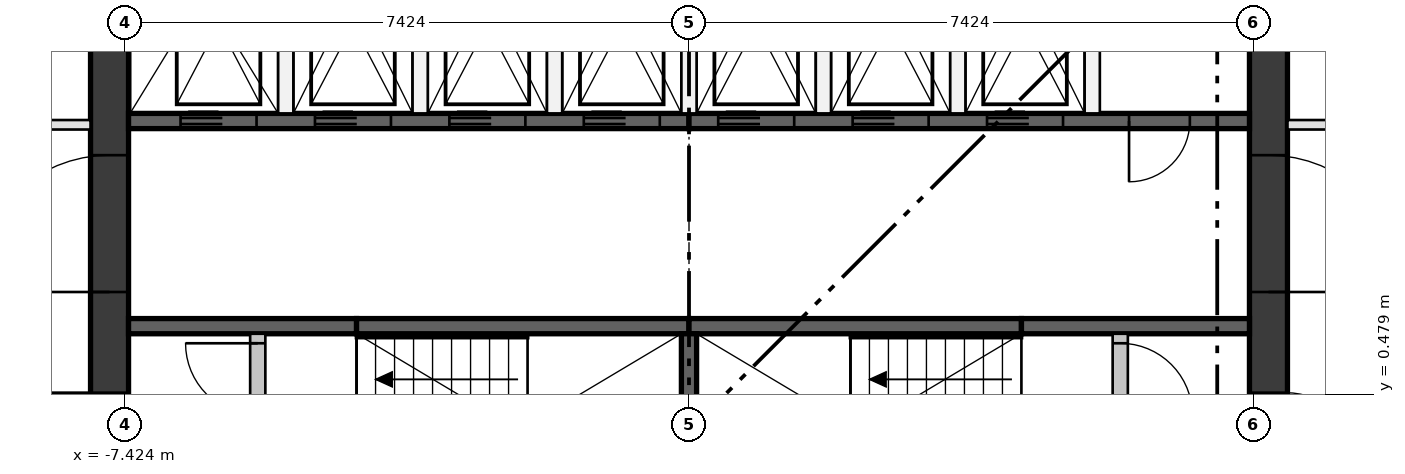
"""IFC4 building model, lengths in metres.
Left out: names, types, materials, properties, quantities, classifications, styles, units other than length and angle.
Written with IfcOpenShell. Run it as: python <this file> out.ifc"""

import sys

from ifc_helpers import new_model, si_unit, direction, frame, frame_2d, origin, place, context, subcontext, project, spatial, rectangle, extrude, element, fill, save


model = new_model("IFC4")
c1 = context("Model", 3, precision=1e-05, world=origin(), true_north=direction((0.0, 1.0)))
c2 = subcontext(c1, "Body", "Model", "MODEL_VIEW")
j1 = project(units=[si_unit("LENGTHUNIT", "METRE"), si_unit("PLANEANGLEUNIT", "RADIAN")], contexts=[c1])
p1 = place(None, origin())
s1 = spatial("IfcSite", under=j1, at=p1, CompositionType="ELEMENT")
p2 = place(p1, origin())
s2 = spatial("IfcBuilding", under=s1, at=p2, CompositionType="ELEMENT")
p3 = place(p2, frame((0.0, 0.0, 194.35)))
s3 = spatial("IfcBuildingStorey", under=s2, at=p3, CompositionType="ELEMENT", Elevation=194.35)
p4 = place(p3, frame((-7.624, -7.374, 0.0), z_axis=(0.0, 0.0, 1.0), x_axis=(0.0, 1.0, 0.0)))
e1 = element("IfcWall", 1, at=p4, inside=s3, PredefinedType="SHEAR", context=c2, shape_type="SweptSolid", body=[
    extrude(rectangle(XDim=14.748, YDim=0.5, at=frame_2d((7.374, 0.0))), origin(), (0.0, 0.0, 1.0), 3.35),
])
p5 = place(p4, frame((6.874, 0.0, 0.0)))
e2 = element("IfcOpeningElement", 2, at=p5, cuts=e1, PredefinedType="OPENING", context=c2, shape_type="SweptSolid", body=[
    extrude(rectangle(XDim=1.0, YDim=2.1, at=frame_2d((0.5, 1.05))), frame((0.0, 0.26, 0.0), z_axis=(0.0, -1.0, 0.0), x_axis=(1.0, 0.0, 0.0)), (0.0, 0.0, 1.0), 0.52),
])
p6 = place(p4, frame((3.75, 0.0, 0.0)))
e3 = element("IfcOpeningElement", 3, at=p6, cuts=e1, PredefinedType="OPENING", context=c2, shape_type="SweptSolid", body=[
    extrude(rectangle(XDim=1.8, YDim=2.1, at=frame_2d((0.9, 1.05))), frame((0.0, 0.26, 0.0), z_axis=(0.0, -1.0, 0.0), x_axis=(1.0, 0.0, 0.0)), (0.0, 0.0, 1.0), 0.52),
])
p7 = place(p4, frame((9.198, 0.0, 0.0)))
e4 = element("IfcOpeningElement", 4, at=p7, cuts=e1, PredefinedType="OPENING", context=c2, shape_type="SweptSolid", body=[
    extrude(rectangle(XDim=1.8, YDim=2.1, at=frame_2d((0.9, 1.05))), frame((0.0, 0.26, 0.0), z_axis=(0.0, -1.0, 0.0), x_axis=(1.0, 0.0, 0.0)), (0.0, 0.0, 1.0), 0.52),
])
p8 = place(p3, frame((7.624, -7.374, 0.0), z_axis=(0.0, 0.0, 1.0), x_axis=(0.0, 1.0, 0.0)))
e5 = element("IfcWall", 5, at=p8, inside=s3, PredefinedType="SHEAR", context=c2, shape_type="SweptSolid", body=[
    extrude(rectangle(XDim=14.748, YDim=0.5, at=frame_2d((7.374, 0.0))), origin(), (0.0, 0.0, 1.0), 3.35),
])
p9 = place(p8, frame((6.874, 0.0, 0.0)))
e6 = element("IfcOpeningElement", 6, at=p9, cuts=e5, PredefinedType="OPENING", context=c2, shape_type="SweptSolid", body=[
    extrude(rectangle(XDim=1.0, YDim=2.1, at=frame_2d((0.5, 1.05))), frame((0.0, 0.26, 0.0), z_axis=(0.0, -1.0, 0.0), x_axis=(1.0, 0.0, 0.0)), (0.0, 0.0, 1.0), 0.52),
])
p10 = place(p8, frame((3.75, 0.0, 0.0)))
e7 = element("IfcOpeningElement", 7, at=p10, cuts=e5, PredefinedType="OPENING", context=c2, shape_type="SweptSolid", body=[
    extrude(rectangle(XDim=1.8, YDim=2.1, at=frame_2d((0.9, 1.05))), frame((0.0, 0.26, 0.0), z_axis=(0.0, -1.0, 0.0), x_axis=(1.0, 0.0, 0.0)), (0.0, 0.0, 1.0), 0.52),
])
p11 = place(p8, frame((9.198, 0.0, 0.0)))
e8 = element("IfcOpeningElement", 8, at=p11, cuts=e5, PredefinedType="OPENING", context=c2, shape_type="SweptSolid", body=[
    extrude(rectangle(XDim=1.8, YDim=2.1, at=frame_2d((0.9, 1.05))), frame((0.0, 0.26, 0.0), z_axis=(0.0, -1.0, 0.0), x_axis=(1.0, 0.0, 0.0)), (0.0, 0.0, 1.0), 0.52),
])
p12 = place(p3, frame((-7.374, 4.074, 0.0), z_axis=(0.0, 0.0, 1.0), x_axis=(1.0, 0.0, 0.0)))
e9 = element("IfcWall", 9, at=p12, inside=s3, PredefinedType="SHEAR", context=c2, shape_type="SweptSolid", body=[
    extrude(rectangle(XDim=7.374, YDim=0.2, at=frame_2d((3.687, 0.0))), origin(), (0.0, 0.0, 1.0), 3.0),
])
p13 = place(p12, frame((0.684, 0.0, 0.0)))
e10 = element("IfcOpeningElement", 10, at=p13, cuts=e9, PredefinedType="OPENING", context=c2, shape_type="SweptSolid", body=[
    extrude(rectangle(XDim=1.0, YDim=2.1, at=frame_2d((0.5, 1.05))), frame((0.0, 0.11, 0.0), z_axis=(0.0, -1.0, 0.0), x_axis=(1.0, 0.0, 0.0)), (0.0, 0.0, 1.0), 0.22),
])
p14 = place(p12, frame((2.453, 0.0, 0.0)))
e11 = element("IfcOpeningElement", 11, at=p14, cuts=e9, PredefinedType="OPENING", context=c2, shape_type="SweptSolid", body=[
    extrude(rectangle(XDim=1.0, YDim=2.1, at=frame_2d((0.5, 1.05))), frame((0.0, 0.11, 0.0), z_axis=(0.0, -1.0, 0.0), x_axis=(1.0, 0.0, 0.0)), (0.0, 0.0, 1.0), 0.22),
])
p15 = place(p12, frame((4.221, 0.0, 0.0)))
e12 = element("IfcOpeningElement", 12, at=p15, cuts=e9, PredefinedType="OPENING", context=c2, shape_type="SweptSolid", body=[
    extrude(rectangle(XDim=1.0, YDim=2.1, at=frame_2d((0.5, 1.05))), frame((0.0, 0.11, 0.0), z_axis=(0.0, -1.0, 0.0), x_axis=(1.0, 0.0, 0.0)), (0.0, 0.0, 1.0), 0.22),
])
p16 = place(p12, frame((5.99, 0.0, 0.0)))
e13 = element("IfcOpeningElement", 13, at=p16, cuts=e9, PredefinedType="OPENING", context=c2, shape_type="SweptSolid", body=[
    extrude(rectangle(XDim=1.0, YDim=2.1, at=frame_2d((0.5, 1.05))), frame((0.0, 0.11, 0.0), z_axis=(0.0, -1.0, 0.0), x_axis=(1.0, 0.0, 0.0)), (0.0, 0.0, 1.0), 0.22),
])
p17 = place(p3, frame((0.0, 4.074, 0.0), z_axis=(0.0, 0.0, 1.0), x_axis=(1.0, 0.0, 0.0)))
e14 = element("IfcWall", 14, at=p17, inside=s3, PredefinedType="SHEAR", context=c2, shape_type="SweptSolid", body=[
    extrude(rectangle(XDim=7.374, YDim=0.2, at=frame_2d((3.687, 0.0))), origin(), (0.0, 0.0, 1.0), 3.0),
])
p18 = place(p17, frame((0.384, 0.0, 0.0)))
e15 = element("IfcOpeningElement", 15, at=p18, cuts=e14, PredefinedType="OPENING", context=c2, shape_type="SweptSolid", body=[
    extrude(rectangle(XDim=1.0, YDim=2.1, at=frame_2d((0.5, 1.05))), frame((0.0, 0.11, 0.0), z_axis=(0.0, -1.0, 0.0), x_axis=(1.0, 0.0, 0.0)), (0.0, 0.0, 1.0), 0.22),
])
p19 = place(p17, frame((2.153, 0.0, 0.0)))
e16 = element("IfcOpeningElement", 16, at=p19, cuts=e14, PredefinedType="OPENING", context=c2, shape_type="SweptSolid", body=[
    extrude(rectangle(XDim=1.0, YDim=2.1, at=frame_2d((0.5, 1.05))), frame((0.0, 0.11, 0.0), z_axis=(0.0, -1.0, 0.0), x_axis=(1.0, 0.0, 0.0)), (0.0, 0.0, 1.0), 0.22),
])
p20 = place(p17, frame((3.921, 0.0, 0.0)))
e17 = element("IfcOpeningElement", 17, at=p20, cuts=e14, PredefinedType="OPENING", context=c2, shape_type="SweptSolid", body=[
    extrude(rectangle(XDim=1.0, YDim=2.1, at=frame_2d((0.5, 1.05))), frame((0.0, 0.11, 0.0), z_axis=(0.0, -1.0, 0.0), x_axis=(1.0, 0.0, 0.0)), (0.0, 0.0, 1.0), 0.22),
])
p21 = place(p17, frame((5.79, 0.0, 0.0)))
e18 = element("IfcOpeningElement", 18, at=p21, cuts=e14, PredefinedType="OPENING", context=c2, shape_type="SweptSolid", body=[
    extrude(rectangle(XDim=0.8, YDim=2.1, at=frame_2d((0.4, 1.05))), frame((0.0, 0.11, 0.0), z_axis=(0.0, -1.0, 0.0), x_axis=(1.0, 0.0, 0.0)), (0.0, 0.0, 1.0), 0.22),
])
p22 = place(p3, frame((-7.374, 1.375, 0.0), z_axis=(0.0, 0.0, 1.0), x_axis=(1.0, 0.0, 0.0)))
e19 = element("IfcWall", 19, at=p22, inside=s3, PredefinedType="SHEAR", context=c2, shape_type="SweptSolid", body=[
    extrude(rectangle(XDim=3.0, YDim=0.2, at=frame_2d((1.5, 0.0))), origin(), (0.0, 0.0, 1.0), 3.0),
])
for number, where, z_axis, x_axis in (
    (20, (-4.374, 1.375, 0.0), (0.0, 0.0, 1.0), (1.0, 0.0, 0.0)),
    (21, (0.0, 1.375, 0.0), (0.0, 0.0, 1.0), (1.0, 0.0, 0.0)),
):
    element("IfcWall", number, at=place(p3, frame(where, z_axis=z_axis, x_axis=x_axis)), inside=s3, PredefinedType="SHEAR", context=c2, shape_type="SweptSolid", body=[
        extrude(rectangle(XDim=4.374, YDim=0.2, at=frame_2d((2.187, 0.0))), origin(), (0.0, 0.0, 1.0), 3.0),
    ])
p23 = place(p3, frame((4.374, 1.375, 0.0), z_axis=(0.0, 0.0, 1.0), x_axis=(1.0, 0.0, 0.0)))
e22 = element("IfcWall", 22, at=p23, inside=s3, PredefinedType="SHEAR", context=c2, shape_type="SweptSolid", body=[
    extrude(rectangle(XDim=3.0, YDim=0.2, at=frame_2d((1.5, 0.0))), origin(), (0.0, 0.0, 1.0), 3.0),
])
p24 = place(p3, frame((0.0, -1.275, 0.0), z_axis=(0.0, 0.0, 1.0), x_axis=(0.0, 1.0, 0.0)))
e23 = element("IfcWall", 23, at=p24, inside=s3, PredefinedType="SHEAR", context=c2, shape_type="SweptSolid", body=[
    extrude(rectangle(XDim=2.55, YDim=0.2, at=frame_2d((1.275, 0.0))), origin(), (0.0, 0.0, 1.0), 3.0),
])
for number, where, z_axis, x_axis in (
    (24, (-5.305, 4.174, 0.0), (0.0, 0.0, 1.0), (0.0, 1.0, 0.0)),
    (25, (-3.537, 4.174, 0.0), (0.0, 0.0, 1.0), (0.0, 1.0, 0.0)),
    (26, (-1.769, 4.174, 0.0), (0.0, 0.0, 1.0), (0.0, 1.0, 0.0)),
    (27, (0.0, 4.174, 0.0), (0.0, 0.0, 1.0), (0.0, 1.0, 0.0)),
    (28, (1.769, 4.174, 0.0), (0.0, 0.0, 1.0), (0.0, 1.0, 0.0)),
    (29, (3.537, 4.174, 0.0), (0.0, 0.0, 1.0), (0.0, 1.0, 0.0)),
    (30, (5.305, 4.174, 0.0), (0.0, 0.0, 1.0), (0.0, 1.0, 0.0)),
):
    element("IfcWall", number, at=place(p3, frame(where, z_axis=z_axis, x_axis=x_axis)), inside=s3, PredefinedType="PARTITIONING", context=c2, shape_type="SweptSolid", body=[
        extrude(rectangle(XDim=3.2, YDim=0.2, at=frame_2d((1.6, 0.0))), origin(), (0.0, 0.0, 1.0), 3.0),
    ])
p25 = place(p3, frame((-5.674, -1.275, 0.0), z_axis=(0.0, 0.0, 1.0), x_axis=(0.0, 1.0, 0.0)))
e31 = element("IfcWall", 31, at=p25, inside=s3, PredefinedType="PARTITIONING", context=c2, shape_type="SweptSolid", body=[
    extrude(rectangle(XDim=2.55, YDim=0.2, at=frame_2d((1.275, 0.0))), origin(), (0.0, 0.0, 1.0), 3.0),
])
p26 = place(p25, frame((0.125, 0.0, 0.0)))
e32 = element("IfcOpeningElement", 32, at=p26, cuts=e31, PredefinedType="OPENING", context=c2, shape_type="SweptSolid", body=[
    extrude(rectangle(XDim=0.95, YDim=2.1, at=frame_2d((0.475, 1.05))), frame((0.0, 0.11, 0.0), z_axis=(0.0, -1.0, 0.0), x_axis=(1.0, 0.0, 0.0)), (0.0, 0.0, 1.0), 0.22),
])
p27 = place(p25, frame((1.475, 0.0, 0.0)))
e33 = element("IfcOpeningElement", 33, at=p27, cuts=e31, PredefinedType="OPENING", context=c2, shape_type="SweptSolid", body=[
    extrude(rectangle(XDim=0.95, YDim=2.1, at=frame_2d((0.475, 1.05))), frame((0.0, 0.11, 0.0), z_axis=(0.0, -1.0, 0.0), x_axis=(1.0, 0.0, 0.0)), (0.0, 0.0, 1.0), 0.22),
])
p28 = place(p3, frame((5.674, -1.275, 0.0), z_axis=(0.0, 0.0, 1.0), x_axis=(0.0, 1.0, 0.0)))
e34 = element("IfcWall", 34, at=p28, inside=s3, PredefinedType="PARTITIONING", context=c2, shape_type="SweptSolid", body=[
    extrude(rectangle(XDim=2.55, YDim=0.2, at=frame_2d((1.275, 0.0))), origin(), (0.0, 0.0, 1.0), 3.0),
])
p29 = place(p28, frame((0.125, 0.0, 0.0)))
e35 = element("IfcOpeningElement", 35, at=p29, cuts=e34, PredefinedType="OPENING", context=c2, shape_type="SweptSolid", body=[
    extrude(rectangle(XDim=0.95, YDim=2.1, at=frame_2d((0.475, 1.05))), frame((0.0, 0.11, 0.0), z_axis=(0.0, -1.0, 0.0), x_axis=(1.0, 0.0, 0.0)), (0.0, 0.0, 1.0), 0.22),
])
p30 = place(p28, frame((1.475, 0.0, 0.0)))
e36 = element("IfcOpeningElement", 36, at=p30, cuts=e34, PredefinedType="OPENING", context=c2, shape_type="SweptSolid", body=[
    extrude(rectangle(XDim=0.95, YDim=2.1, at=frame_2d((0.475, 1.05))), frame((0.0, 0.11, 0.0), z_axis=(0.0, -1.0, 0.0), x_axis=(1.0, 0.0, 0.0)), (0.0, 0.0, 1.0), 0.22),
])
p31 = place(p3, frame((7.874, 4.024, 0.0), z_axis=(0.0, 0.0, 1.0), x_axis=(1.0, 0.0, 0.0)))
e37 = element("IfcWall", 37, at=p31, inside=s3, PredefinedType="PARTITIONING", context=c2, shape_type="SweptSolid", body=[
    extrude(rectangle(XDim=3.95, YDim=0.125, at=frame_2d((1.975, 0.0))), origin(), (0.0, 0.0, 1.0), 3.0),
])
p32 = place(p31, frame((1.3, 0.0, 0.0)))
e38 = element("IfcOpeningElement", 38, at=p32, cuts=e37, PredefinedType="OPENING", context=c2, shape_type="SweptSolid", body=[
    extrude(rectangle(XDim=1.0, YDim=2.1, at=frame_2d((0.5, 1.05))), frame((0.0, 0.073, 0.0), z_axis=(0.0, -1.0, 0.0), x_axis=(1.0, 0.0, 0.0)), (0.0, 0.0, 1.0), 0.145),
])
p33 = place(p3, frame((-11.087, 4.024, 0.0), z_axis=(0.0, 0.0, 1.0), x_axis=(1.0, 0.0, 0.0)))
e39 = element("IfcWall", 39, at=p33, inside=s3, PredefinedType="PARTITIONING", context=c2, shape_type="SweptSolid", body=[
    extrude(rectangle(XDim=3.213, YDim=0.125, at=frame_2d((1.606, 0.0))), origin(), (0.0, 0.0, 1.0), 3.0),
])
p34 = place(p33, frame((1.1, 0.0, 0.0)))
e40 = element("IfcOpeningElement", 40, at=p34, cuts=e39, PredefinedType="OPENING", context=c2, shape_type="SweptSolid", body=[
    extrude(rectangle(XDim=1.0, YDim=2.1, at=frame_2d((0.5, 1.05))), frame((0.0, 0.073, 0.0), z_axis=(0.0, -1.0, 0.0), x_axis=(1.0, 0.0, 0.0)), (0.0, 0.0, 1.0), 0.145),
])
p35 = place(p13, frame((1.0, 0.0, 0.0), z_axis=(0.0, 0.0, 1.0), x_axis=(-1.0, 0.0, 0.0)))
e41 = element("IfcDoor", 41, at=p35, inside=s3, OperationType="DOUBLE_DOOR_SLIDING", PredefinedType="DOOR", context=c2, shape_type="SweptSolid", body=[
    extrude(rectangle(XDim=1.0, YDim=2.1, at=frame_2d((0.5, 1.05))), frame((0.0, 0.025, 0.0), z_axis=(0.0, -1.0, 0.0), x_axis=(1.0, 0.0, 0.0)), (0.0, 0.0, 1.0), 0.05),
])
fill(e10, e41)
p36 = place(p14, frame((1.0, 0.0, 0.0), z_axis=(0.0, 0.0, 1.0), x_axis=(-1.0, 0.0, 0.0)))
e42 = element("IfcDoor", 42, at=p36, inside=s3, OperationType="DOUBLE_DOOR_SLIDING", PredefinedType="DOOR", context=c2, shape_type="SweptSolid", body=[
    extrude(rectangle(XDim=1.0, YDim=2.1, at=frame_2d((0.5, 1.05))), frame((0.0, 0.025, 0.0), z_axis=(0.0, -1.0, 0.0), x_axis=(1.0, 0.0, 0.0)), (0.0, 0.0, 1.0), 0.05),
])
fill(e11, e42)
p37 = place(p15, frame((1.0, 0.0, 0.0), z_axis=(0.0, 0.0, 1.0), x_axis=(-1.0, 0.0, 0.0)))
e43 = element("IfcDoor", 43, at=p37, inside=s3, OperationType="DOUBLE_DOOR_SLIDING", PredefinedType="DOOR", context=c2, shape_type="SweptSolid", body=[
    extrude(rectangle(XDim=1.0, YDim=2.1, at=frame_2d((0.5, 1.05))), frame((0.0, 0.025, 0.0), z_axis=(0.0, -1.0, 0.0), x_axis=(1.0, 0.0, 0.0)), (0.0, 0.0, 1.0), 0.05),
])
fill(e12, e43)
p38 = place(p16, frame((1.0, 0.0, 0.0), z_axis=(0.0, 0.0, 1.0), x_axis=(-1.0, 0.0, 0.0)))
e44 = element("IfcDoor", 44, at=p38, inside=s3, OperationType="DOUBLE_DOOR_SLIDING", PredefinedType="DOOR", context=c2, shape_type="SweptSolid", body=[
    extrude(rectangle(XDim=1.0, YDim=2.1, at=frame_2d((0.5, 1.05))), frame((0.0, 0.025, 0.0), z_axis=(0.0, -1.0, 0.0), x_axis=(1.0, 0.0, 0.0)), (0.0, 0.0, 1.0), 0.05),
])
fill(e13, e44)
p39 = place(p18, frame((1.0, 0.0, 0.0), z_axis=(0.0, 0.0, 1.0), x_axis=(-1.0, 0.0, 0.0)))
e45 = element("IfcDoor", 45, at=p39, inside=s3, OperationType="DOUBLE_DOOR_SLIDING", PredefinedType="DOOR", context=c2, shape_type="SweptSolid", body=[
    extrude(rectangle(XDim=1.0, YDim=2.1, at=frame_2d((0.5, 1.05))), frame((0.0, 0.025, 0.0), z_axis=(0.0, -1.0, 0.0), x_axis=(1.0, 0.0, 0.0)), (0.0, 0.0, 1.0), 0.05),
])
fill(e15, e45)
p40 = place(p19, frame((1.0, 0.0, 0.0), z_axis=(0.0, 0.0, 1.0), x_axis=(-1.0, 0.0, 0.0)))
e46 = element("IfcDoor", 46, at=p40, inside=s3, OperationType="DOUBLE_DOOR_SLIDING", PredefinedType="DOOR", context=c2, shape_type="SweptSolid", body=[
    extrude(rectangle(XDim=1.0, YDim=2.1, at=frame_2d((0.5, 1.05))), frame((0.0, 0.025, 0.0), z_axis=(0.0, -1.0, 0.0), x_axis=(1.0, 0.0, 0.0)), (0.0, 0.0, 1.0), 0.05),
])
fill(e16, e46)
p41 = place(p20, frame((1.0, 0.0, 0.0), z_axis=(0.0, 0.0, 1.0), x_axis=(-1.0, 0.0, 0.0)))
e47 = element("IfcDoor", 47, at=p41, inside=s3, OperationType="DOUBLE_DOOR_SLIDING", PredefinedType="DOOR", context=c2, shape_type="SweptSolid", body=[
    extrude(rectangle(XDim=1.0, YDim=2.1, at=frame_2d((0.5, 1.05))), frame((0.0, 0.025, 0.0), z_axis=(0.0, -1.0, 0.0), x_axis=(1.0, 0.0, 0.0)), (0.0, 0.0, 1.0), 0.05),
])
fill(e17, e47)
p42 = place(p27, origin())
e48 = element("IfcDoor", 48, at=p42, inside=s3, OperationType="SINGLE_SWING_RIGHT", PredefinedType="DOOR", context=c2, shape_type="SweptSolid", body=[
    extrude(rectangle(XDim=0.95, YDim=2.1, at=frame_2d((0.475, 1.05))), frame((0.0, 0.025, 0.0), z_axis=(0.0, -1.0, 0.0), x_axis=(1.0, 0.0, 0.0)), (0.0, 0.0, 1.0), 0.05),
])
fill(e33, e48)
p43 = place(p30, frame((0.95, 0.0, 0.0), z_axis=(0.0, 0.0, 1.0), x_axis=(-1.0, 0.0, 0.0)))
e49 = element("IfcDoor", 49, at=p43, inside=s3, OperationType="SINGLE_SWING_LEFT", PredefinedType="DOOR", context=c2, shape_type="SweptSolid", body=[
    extrude(rectangle(XDim=0.95, YDim=2.1, at=frame_2d((0.475, 1.05))), frame((0.0, 0.025, 0.0), z_axis=(0.0, -1.0, 0.0), x_axis=(1.0, 0.0, 0.0)), (0.0, 0.0, 1.0), 0.05),
])
fill(e36, e49)
p44 = place(p21, frame((0.8, 0.0, 0.0), z_axis=(0.0, 0.0, 1.0), x_axis=(-1.0, 0.0, 0.0)))
e50 = element("IfcDoor", 50, at=p44, inside=s3, OperationType="SINGLE_SWING_LEFT", PredefinedType="DOOR", context=c2, shape_type="SweptSolid", body=[
    extrude(rectangle(XDim=0.8, YDim=2.1, at=frame_2d((0.4, 1.05))), frame((0.0, 0.025, 0.0), z_axis=(0.0, -1.0, 0.0), x_axis=(1.0, 0.0, 0.0)), (0.0, 0.0, 1.0), 0.05),
])
fill(e18, e50)
p45 = place(p5, origin())
e51 = element("IfcDoor", 51, at=p45, inside=s3, OperationType="SINGLE_SWING_RIGHT", PredefinedType="DOOR", context=c2, shape_type="SweptSolid", body=[
    extrude(rectangle(XDim=1.0, YDim=2.1, at=frame_2d((0.5, 1.05))), frame((0.0, 0.25, 0.0), z_axis=(0.0, -1.0, 0.0), x_axis=(1.0, 0.0, 0.0)), (0.0, 0.0, 1.0), 0.05),
])
fill(e2, e51)
p46 = place(p7, origin())
e52 = element("IfcDoor", 52, at=p46, inside=s3, OperationType="DOUBLE_DOOR_SINGLE_SWING", PredefinedType="DOOR", context=c2, shape_type="SweptSolid", body=[
    extrude(rectangle(XDim=1.8, YDim=2.1, at=frame_2d((0.9, 1.05))), frame((0.0, 0.025, 0.0), z_axis=(0.0, -1.0, 0.0), x_axis=(1.0, 0.0, 0.0)), (0.0, 0.0, 1.0), 0.05),
])
fill(e4, e52)
p47 = place(p9, frame((1.0, 0.0, 0.0), z_axis=(0.0, 0.0, 1.0), x_axis=(-1.0, 0.0, 0.0)))
e53 = element("IfcDoor", 53, at=p47, inside=s3, OperationType="SINGLE_SWING_LEFT", PredefinedType="DOOR", context=c2, shape_type="SweptSolid", body=[
    extrude(rectangle(XDim=1.0, YDim=2.1, at=frame_2d((0.5, 1.05))), frame((0.0, 0.25, 0.0), z_axis=(0.0, -1.0, 0.0), x_axis=(1.0, 0.0, 0.0)), (0.0, 0.0, 1.0), 0.05),
])
fill(e6, e53)
p48 = place(p11, frame((1.8, 0.0, 0.0), z_axis=(0.0, 0.0, 1.0), x_axis=(-1.0, 0.0, 0.0)))
e54 = element("IfcDoor", 54, at=p48, inside=s3, OperationType="DOUBLE_DOOR_SINGLE_SWING", PredefinedType="DOOR", context=c2, shape_type="SweptSolid", body=[
    extrude(rectangle(XDim=1.8, YDim=2.1, at=frame_2d((0.9, 1.05))), frame((0.0, 0.025, 0.0), z_axis=(0.0, -1.0, 0.0), x_axis=(1.0, 0.0, 0.0)), (0.0, 0.0, 1.0), 0.05),
])
fill(e8, e54)
save(model, sys.argv[1])
